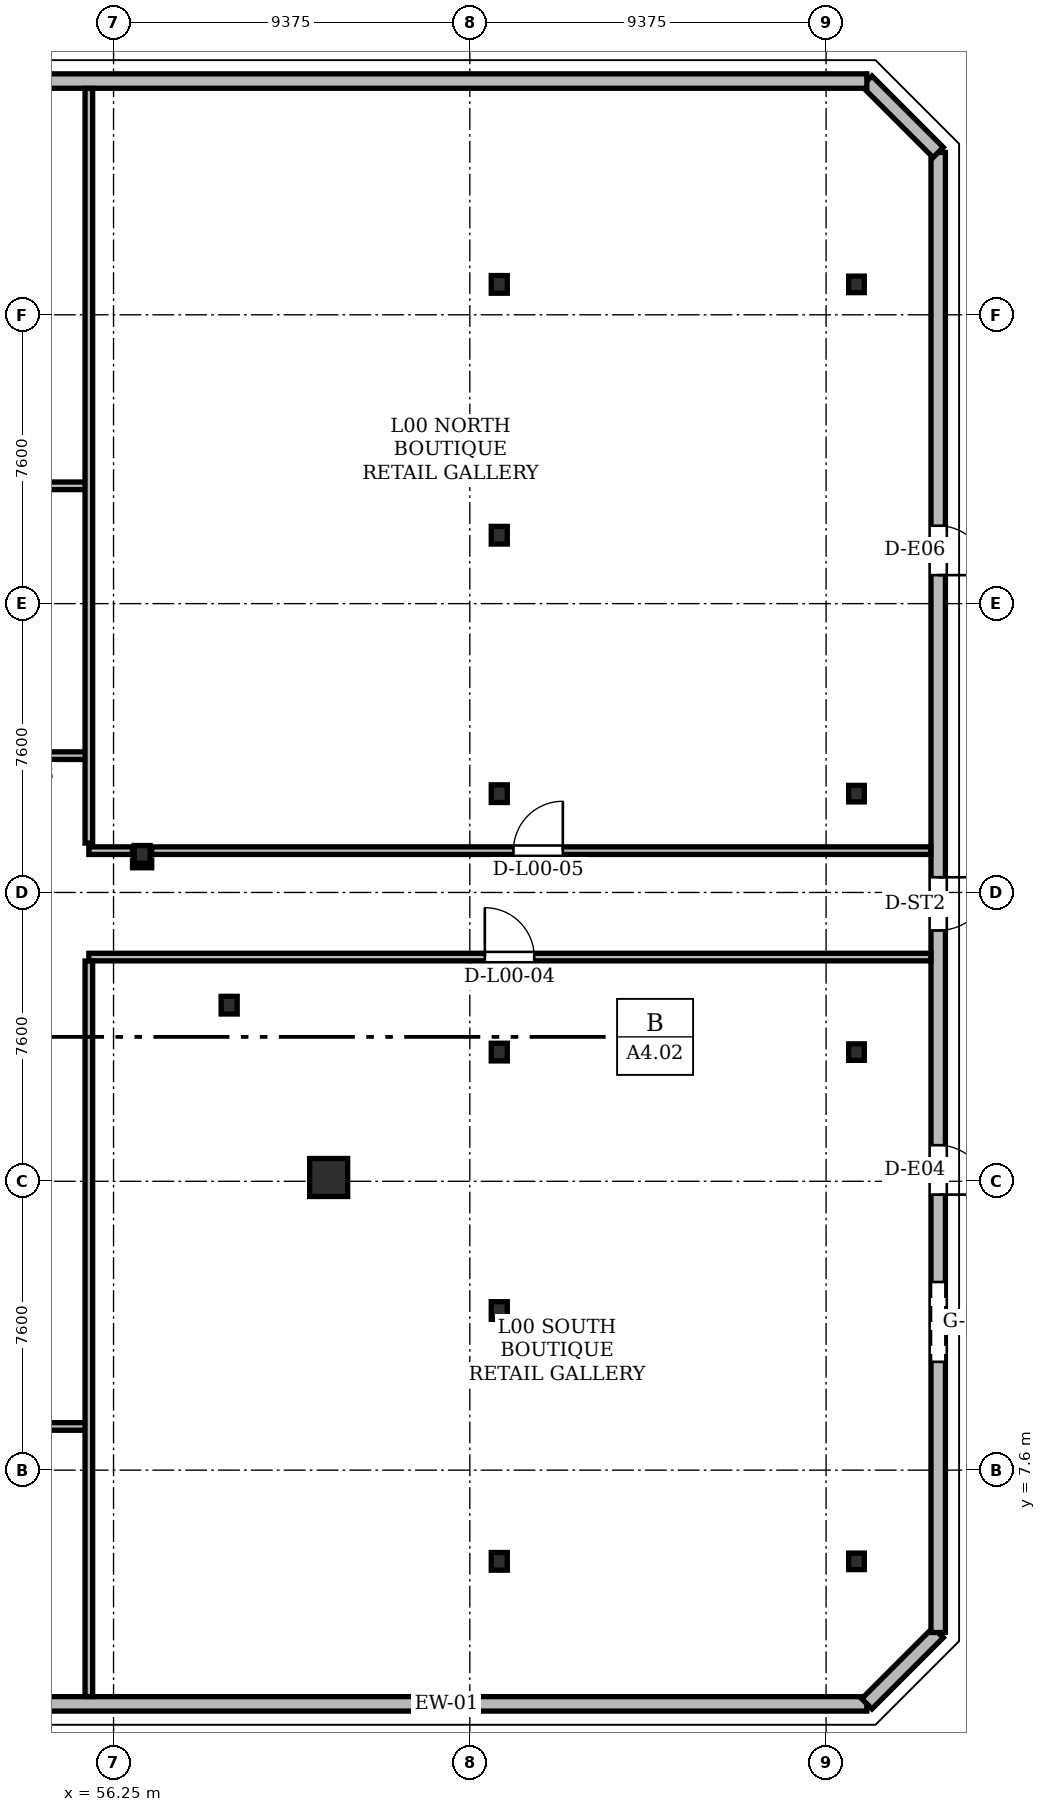
"""IFC4 building model, lengths in metres.
Left out: names, types, materials, properties, quantities, classifications, styles, units other than length and angle.
Written with IfcOpenShell. Run it as: python <this file> out.ifc"""

import sys

from ifc_helpers import new_model, si_unit, direction, frame, frame_2d, origin, origin_2d, place, context, subcontext, project, spatial, rectangle, hollow_rectangle, i_section, extrude, element, fill, save


model = new_model("IFC4")
c1 = context("Model", 3, precision=1e-05, world=origin(), true_north=direction((0.0, 1.0)))
c2 = subcontext(c1, "Body", "Model", "MODEL_VIEW")
j1 = project(units=[si_unit("LENGTHUNIT", "METRE"), si_unit("PLANEANGLEUNIT", "RADIAN")], contexts=[c1])
p1 = place(None, origin())
s1 = spatial("IfcSite", under=j1, at=p1, CompositionType="ELEMENT")
p2 = place(p1, origin())
s2 = spatial("IfcBuilding", under=s1, at=p2, CompositionType="ELEMENT")
p3 = place(p2, origin())
s3 = spatial("IfcBuildingStorey", under=s2, at=p3, CompositionType="ELEMENT", Elevation=0.0)
p4 = place(p3, frame((61.91, 15.3, 0.004), z_axis=(0.0, 0.0, 1.0), x_axis=(1.0, 0.0, 0.0)))
e1 = element("IfcColumn", 1, at=p4, inside=s3, PredefinedType="COLUMN", context=c2, shape_type="SweptSolid", body=[
    extrude(hollow_rectangle(XDim=1.0, YDim=1.0, WallThickness=0.085, at=origin_2d()), origin(), (0.0, 0.0, 1.0), 5.391),
])
for number, where, z_axis, x_axis in (
    (2, (59.292, 19.834, 0.004), (0.0, 0.0, 1.0), (1.0, 0.0, 0.0)),
    (3, (57.002, 23.802, 0.004), (0.0, 0.0, 1.0), (1.0, 0.0, 0.0)),
):
    element("IfcColumn", number, at=place(p3, frame(where, z_axis=z_axis, x_axis=x_axis)), inside=s3, PredefinedType="COLUMN", context=c2, shape_type="SweptSolid", body=[
        extrude(i_section(OverallWidth=0.422, OverallDepth=0.465, WebThickness=0.045, FlangeThickness=0.072, at=origin_2d()), origin(), (0.0, 0.0, 1.0), 5.391),
    ])
for number, where, z_axis, x_axis in (
    (4, (66.4, 5.2, 0.0), (0.0, 0.0, 1.0), (1.0, 0.0, 0.0)),
    (5, (66.4, 11.8, 0.0), (0.0, 0.0, 1.0), (1.0, 0.0, 0.0)),
    (6, (66.4, 18.6, 0.0), (0.0, 0.0, 1.0), (1.0, 0.0, 0.0)),
    (7, (66.4, 25.4, 0.0), (0.0, 0.0, 1.0), (1.0, 0.0, 0.0)),
    (8, (66.4, 32.2, 0.0), (0.0, 0.0, 1.0), (1.0, 0.0, 0.0)),
    (9, (66.4, 38.8, 0.0), (0.0, 0.0, 1.0), (1.0, 0.0, 0.0)),
):
    element("IfcColumn", number, at=place(p3, frame(where, z_axis=z_axis, x_axis=x_axis)), inside=s3, PredefinedType="COLUMN", context=c2, shape_type="SweptSolid", body=[
        extrude(i_section(OverallWidth=0.422, OverallDepth=0.465, WebThickness=0.045, FlangeThickness=0.072, at=origin_2d()), origin(), (0.0, 0.0, 1.0), 5.4),
    ])
for number, where, z_axis, x_axis in (
    (10, (75.8, 5.2, 0.0), (0.0, 0.0, 1.0), (1.0, 0.0, 0.0)),
    (11, (75.8, 18.6, 0.0), (0.0, 0.0, 1.0), (1.0, 0.0, 0.0)),
    (12, (75.8, 25.4, 0.0), (0.0, 0.0, 1.0), (1.0, 0.0, 0.0)),
    (13, (75.8, 38.8, 0.0), (0.0, 0.0, 1.0), (1.0, 0.0, 0.0)),
):
    element("IfcColumn", number, at=place(p3, frame(where, z_axis=z_axis, x_axis=x_axis)), inside=s3, PredefinedType="COLUMN", context=c2, shape_type="SweptSolid", body=[
        extrude(i_section(OverallWidth=0.411, OverallDepth=0.434, WebThickness=0.036, FlangeThickness=0.057, at=origin_2d()), origin(), (0.0, 0.0, 1.0), 5.4),
    ])
p5 = place(p3, frame((76.072, 1.45, 0.0), z_axis=(0.0, 0.0, 1.0), x_axis=(-1.0, 0.0, 0.0)))
e14 = element("IfcWall", 14, at=p5, inside=s3, PredefinedType="SOLIDWALL", context=c2, shape_type="SweptSolid", body=[
    extrude(rectangle(XDim=77.145, YDim=0.38, at=frame_2d((38.572, 0.0))), origin(), (0.0, 0.0, 1.0), 4.183),
])
p6 = place(p5, frame((40.972, 0.0, 0.0)))
e15 = element("IfcOpeningElement", 15, at=p6, cuts=e14, PredefinedType="OPENING", context=c2, shape_type="SweptSolid", body=[
    extrude(rectangle(XDim=1.8, YDim=2.35, at=frame_2d((0.9, 1.175))), frame((0.0, 0.19, 0.0), z_axis=(0.0, -1.0, 0.0), x_axis=(1.0, 0.0, 0.0)), (0.0, 0.0, 1.0), 0.38),
])
p7 = place(p5, frame((34.372, 0.0, 0.0)))
e16 = element("IfcOpeningElement", 16, at=p7, cuts=e14, PredefinedType="OPENING", context=c2, shape_type="SweptSolid", body=[
    extrude(rectangle(XDim=1.8, YDim=2.35, at=frame_2d((0.9, 1.175))), frame((0.0, 0.19, 0.0), z_axis=(0.0, -1.0, 0.0), x_axis=(1.0, 0.0, 0.0)), (0.0, 0.0, 1.0), 0.38),
])
p8 = place(p5, frame((57.422, 0.0, 0.0)))
e17 = element("IfcOpeningElement", 17, at=p8, cuts=e14, PredefinedType="OPENING", context=c2, shape_type="SweptSolid", body=[
    extrude(rectangle(XDim=1.3, YDim=2.25, at=frame_2d((0.65, 1.125))), frame((0.0, 0.19, 0.0), z_axis=(0.0, -1.0, 0.0), x_axis=(1.0, 0.0, 0.0)), (0.0, 0.0, 1.0), 0.38),
])
p9 = place(p5, frame((23.622, 0.0, 0.0)))
e18 = element("IfcOpeningElement", 18, at=p9, cuts=e14, PredefinedType="OPENING", context=c2, shape_type="SweptSolid", body=[
    extrude(rectangle(XDim=1.3, YDim=2.25, at=frame_2d((0.65, 1.125))), frame((0.0, 0.19, 0.0), z_axis=(0.0, -1.0, 0.0), x_axis=(1.0, 0.0, 0.0)), (0.0, 0.0, 1.0), 0.38),
])
p10 = place(p3, frame((77.95, 3.328, 0.0), z_axis=(0.0, 0.0, 1.0), x_axis=(-0.707060812925, -0.70715274646, 0.0)))
e19 = element("IfcWall", 19, at=p10, inside=s3, PredefinedType="SOLIDWALL", context=c2, shape_type="SweptSolid", body=[
    extrude(rectangle(XDim=2.656, YDim=0.38, at=frame_2d((1.328, 0.0))), origin(), (0.0, 0.0, 1.0), 5.12),
])
p11 = place(p3, frame((77.95, 42.272, 0.0), z_axis=(0.0, 0.0, 1.0), x_axis=(0.0, -1.0, 0.0)))
e20 = element("IfcWall", 20, at=p11, inside=s3, PredefinedType="SOLIDWALL", context=c2, shape_type="SweptSolid", body=[
    extrude(rectangle(XDim=38.944, YDim=0.38, at=frame_2d((19.472, 0.0))), origin(), (0.0, 0.0, 1.0), 5.12),
])
p12 = place(p11, frame((26.122, 0.0, 0.0)))
e21 = element("IfcOpeningElement", 21, at=p12, cuts=e20, PredefinedType="OPENING", context=c2, shape_type="SweptSolid", body=[
    extrude(rectangle(XDim=1.3, YDim=2.25, at=frame_2d((0.65, 1.125))), frame((0.0, 0.19, 0.0), z_axis=(0.0, -1.0, 0.0), x_axis=(1.0, 0.0, 0.0)), (0.0, 0.0, 1.0), 0.38),
])
p13 = place(p11, frame((19.072, 0.0, 0.0)))
e22 = element("IfcOpeningElement", 22, at=p13, cuts=e20, PredefinedType="OPENING", context=c2, shape_type="SweptSolid", body=[
    extrude(rectangle(XDim=1.4, YDim=2.2, at=frame_2d((0.7, 1.1))), frame((0.0, 0.19, 0.0), z_axis=(0.0, -1.0, 0.0), x_axis=(1.0, 0.0, 0.0)), (0.0, 0.0, 1.0), 0.38),
])
p14 = place(p11, frame((29.722, 0.0, 0.0)))
e23 = element("IfcOpeningElement", 23, at=p14, cuts=e20, PredefinedType="OPENING", context=c2, shape_type="SweptSolid", body=[
    extrude(rectangle(XDim=2.1, YDim=2.3, at=frame_2d((1.05, 1.15))), frame((0.0, 0.19, 0.0), z_axis=(0.0, -1.0, 0.0), x_axis=(1.0, 0.0, 0.0)), (0.0, 0.0, 1.0), 0.38),
])
p15 = place(p11, frame((9.822, 0.0, 0.0)))
e24 = element("IfcOpeningElement", 24, at=p15, cuts=e20, PredefinedType="OPENING", context=c2, shape_type="SweptSolid", body=[
    extrude(rectangle(XDim=1.3, YDim=2.25, at=frame_2d((0.65, 1.125))), frame((0.0, 0.19, 0.0), z_axis=(0.0, -1.0, 0.0), x_axis=(1.0, 0.0, 0.0)), (0.0, 0.0, 1.0), 0.38),
])
p16 = place(p3, frame((76.072, 44.15, 0.0), z_axis=(0.0, 0.0, 1.0), x_axis=(0.707106781187, -0.707106781187, 0.0)))
e25 = element("IfcWall", 25, at=p16, inside=s3, PredefinedType="SOLIDWALL", context=c2, shape_type="SweptSolid", body=[
    extrude(rectangle(XDim=2.656, YDim=0.38, at=frame_2d((1.328, 0.0))), origin(), (0.0, 0.0, 1.0), 5.12),
])
p17 = place(p3, frame((-1.072, 44.15, 0.0), z_axis=(0.0, 0.0, 1.0), x_axis=(1.0, 0.0, 0.0)))
e26 = element("IfcWall", 26, at=p17, inside=s3, PredefinedType="SOLIDWALL", context=c2, shape_type="SweptSolid", body=[
    extrude(rectangle(XDim=77.145, YDim=0.38, at=frame_2d((38.572, 0.0))), origin(), (0.0, 0.0, 1.0), 5.12),
])
p18 = place(p17, frame((24.872, 0.0, 0.0)))
e27 = element("IfcOpeningElement", 27, at=p18, cuts=e26, PredefinedType="OPENING", context=c2, shape_type="SweptSolid", body=[
    extrude(rectangle(XDim=1.4, YDim=2.2, at=frame_2d((0.7, 1.1))), frame((0.0, 0.19, 0.0), z_axis=(0.0, -1.0, 0.0), x_axis=(1.0, 0.0, 0.0)), (0.0, 0.0, 1.0), 0.38),
])
p19 = place(p17, frame((39.472, 0.0, 0.0)))
e28 = element("IfcOpeningElement", 28, at=p19, cuts=e26, PredefinedType="OPENING", context=c2, shape_type="SweptSolid", body=[
    extrude(rectangle(XDim=3.2, YDim=3.0, at=frame_2d((1.6, 1.5))), frame((0.0, 0.19, 0.0), z_axis=(0.0, -1.0, 0.0), x_axis=(1.0, 0.0, 0.0)), (0.0, 0.0, 1.0), 0.38),
])
p20 = place(p3, frame((13.99, 8.75, 0.0), z_axis=(0.0, 0.0, 1.0), x_axis=(1.0, 0.0, 0.0)))
e29 = element("IfcWall", 29, at=p20, inside=s3, PredefinedType="PARTITIONING", context=c2, shape_type="SweptSolid", body=[
    extrude(rectangle(XDim=41.61, YDim=0.2, at=frame_2d((20.805, 0.0))), origin(), (0.0, 0.0, 1.0), 4.183),
])
p21 = place(p20, frame((6.785, 0.0, 0.0)))
e30 = element("IfcOpeningElement", 30, at=p21, cuts=e29, PredefinedType="OPENING", context=c2, shape_type="SweptSolid", body=[
    extrude(rectangle(XDim=1.3, YDim=2.2, at=frame_2d((0.65, 1.1))), frame((0.0, 0.1, 0.0), z_axis=(0.0, -1.0, 0.0), x_axis=(1.0, 0.0, 0.0)), (0.0, 0.0, 1.0), 0.2),
])
p22 = place(p20, frame((23.235, 0.0, 0.0)))
e31 = element("IfcOpeningElement", 31, at=p22, cuts=e29, PredefinedType="OPENING", context=c2, shape_type="SweptSolid", body=[
    extrude(rectangle(XDim=1.3, YDim=2.2, at=frame_2d((0.65, 1.1))), frame((0.0, 0.1, 0.0), z_axis=(0.0, -1.0, 0.0), x_axis=(1.0, 0.0, 0.0)), (0.0, 0.0, 1.0), 0.2),
])
p23 = place(p20, frame((37.534, 0.0, 0.0)))
e32 = element("IfcOpeningElement", 32, at=p23, cuts=e29, PredefinedType="OPENING", context=c2, shape_type="SweptSolid", body=[
    extrude(rectangle(XDim=1.0, YDim=2.18, at=frame_2d((0.5, 1.09))), frame((0.0, 0.1, 0.0), z_axis=(0.0, -1.0, 0.0), x_axis=(1.0, 0.0, 0.0)), (0.0, 0.0, 1.0), 0.2),
])
p24 = place(p3, frame((55.6, 21.1, 0.0), z_axis=(0.0, 0.0, 1.0), x_axis=(1.0, 0.0, 0.0)))
e33 = element("IfcWall", 33, at=p24, inside=s3, PredefinedType="PARTITIONING", context=c2, shape_type="SweptSolid", body=[
    extrude(rectangle(XDim=22.156, YDim=0.2, at=frame_2d((11.078, 0.0))), origin(), (0.0, 0.0, 1.0), 4.183),
])
p25 = place(p24, frame((10.42, 0.0, 0.0)))
e34 = element("IfcOpeningElement", 34, at=p25, cuts=e33, PredefinedType="OPENING", context=c2, shape_type="SweptSolid", body=[
    extrude(rectangle(XDim=1.3, YDim=2.2, at=frame_2d((0.65, 1.1))), frame((0.0, 0.1, 0.0), z_axis=(0.0, -1.0, 0.0), x_axis=(1.0, 0.0, 0.0)), (0.0, 0.0, 1.0), 0.2),
])
p26 = place(p3, frame((56.749, 23.55, 0.0), z_axis=(0.0, 0.0, 1.0), x_axis=(1.0, 0.0, 0.0)))
e35 = element("IfcWall", 35, at=p26, inside=s3, PredefinedType="PARTITIONING", context=c2, shape_type="SweptSolid", body=[
    extrude(rectangle(XDim=0.505, YDim=0.2, at=frame_2d((0.252, 0.0))), origin(), (0.0, 0.0, 1.0), 4.254),
])
p27 = place(p3, frame((55.6, 23.9, 0.0), z_axis=(0.0, 0.0, 1.0), x_axis=(1.0, 0.0, 0.0)))
e36 = element("IfcWall", 36, at=p27, inside=s3, PredefinedType="PARTITIONING", context=c2, shape_type="SweptSolid", body=[
    extrude(rectangle(XDim=1.149, YDim=0.2, at=frame_2d((0.575, 0.0))), origin(), (0.0, 0.0, 1.0), 5.12),
])
p28 = place(p3, frame((57.254, 23.9, 0.0), z_axis=(0.0, 0.0, 1.0), x_axis=(1.0, 0.0, 0.0)))
e37 = element("IfcWall", 37, at=p28, inside=s3, PredefinedType="PARTITIONING", context=c2, shape_type="SweptSolid", body=[
    extrude(rectangle(XDim=20.502, YDim=0.2, at=frame_2d((10.251, 0.0))), origin(), (0.0, 0.0, 1.0), 4.183),
])
p29 = place(p28, frame((9.519, 0.0, 0.0)))
e38 = element("IfcOpeningElement", 38, at=p29, cuts=e37, PredefinedType="OPENING", context=c2, shape_type="SweptSolid", body=[
    extrude(rectangle(XDim=1.3, YDim=2.2, at=frame_2d((0.65, 1.1))), frame((0.0, 0.1, 0.0), z_axis=(0.0, -1.0, 0.0), x_axis=(1.0, 0.0, 0.0)), (0.0, 0.0, 1.0), 0.2),
])
p30 = place(p3, frame((28.62, 26.4, 0.0), z_axis=(0.0, 0.0, 1.0), x_axis=(1.0, 0.0, 0.0)))
e39 = element("IfcWall", 39, at=p30, inside=s3, PredefinedType="PARTITIONING", context=c2, shape_type="SweptSolid", body=[
    extrude(rectangle(XDim=26.98, YDim=0.2, at=frame_2d((13.49, 0.0))), origin(), (0.0, 0.0, 1.0), 4.183),
])
p31 = place(p30, frame((11.08, 0.0, 0.0)))
e40 = element("IfcOpeningElement", 40, at=p31, cuts=e39, PredefinedType="OPENING", context=c2, shape_type="SweptSolid", body=[
    extrude(rectangle(XDim=1.45, YDim=2.25, at=frame_2d((0.725, 1.125))), frame((0.0, 0.1, 0.0), z_axis=(0.0, -1.0, 0.0), x_axis=(1.0, 0.0, 0.0)), (0.0, 0.0, 1.0), 0.2),
])
p32 = place(p30, frame((20.14, 0.0, 0.0)))
e41 = element("IfcOpeningElement", 41, at=p32, cuts=e39, PredefinedType="OPENING", context=c2, shape_type="SweptSolid", body=[
    extrude(rectangle(XDim=0.88, YDim=2.08, at=frame_2d((0.44, 1.04))), frame((0.0, 0.1, 0.0), z_axis=(0.0, -1.0, 0.0), x_axis=(1.0, 0.0, 0.0)), (0.0, 0.0, 1.0), 0.2),
])
p33 = place(p30, frame((24.414, 0.0, 0.0)))
e42 = element("IfcOpeningElement", 42, at=p33, cuts=e39, PredefinedType="OPENING", context=c2, shape_type="SweptSolid", body=[
    extrude(rectangle(XDim=0.88, YDim=2.08, at=frame_2d((0.44, 1.04))), frame((0.0, 0.1, 0.0), z_axis=(0.0, -1.0, 0.0), x_axis=(1.0, 0.0, 0.0)), (0.0, 0.0, 1.0), 0.2),
])
p34 = place(p3, frame((51.4, 33.5, 0.0), z_axis=(0.0, 0.0, 1.0), x_axis=(1.0, 0.0, 0.0)))
e43 = element("IfcWall", 43, at=p34, inside=s3, PredefinedType="PARTITIONING", context=c2, shape_type="SweptSolid", body=[
    extrude(rectangle(XDim=4.2, YDim=0.2, at=frame_2d((2.1, 0.0))), origin(), (0.0, 0.0, 1.0), 4.254),
])
p35 = place(p3, frame((55.6, 1.644, 0.0), z_axis=(0.0, 0.0, 1.0), x_axis=(0.0, 1.0, 0.0)))
e44 = element("IfcWall", 44, at=p35, inside=s3, PredefinedType="PARTITIONING", context=c2, shape_type="SweptSolid", body=[
    extrude(rectangle(XDim=19.352, YDim=0.2, at=frame_2d((9.676, 0.0))), origin(), (0.0, 0.0, 1.0), 4.254),
])
p36 = place(p3, frame((55.6, 24.1, 0.0), z_axis=(0.0, 0.0, 1.0), x_axis=(0.0, 1.0, 0.0)))
e45 = element("IfcWall", 45, at=p36, inside=s3, PredefinedType="PARTITIONING", context=c2, shape_type="SweptSolid", body=[
    extrude(rectangle(XDim=19.856, YDim=0.2, at=frame_2d((9.928, 0.0))), origin(), (0.0, 0.0, 1.0), 3.91),
])
p37 = place(p12, origin())
e46 = element("IfcDoor", 46, at=p37, inside=s3, OperationType="SINGLE_SWING_RIGHT", PredefinedType="DOOR", context=c2, shape_type="SweptSolid", body=[
    extrude(rectangle(XDim=1.3, YDim=2.25, at=frame_2d((0.65, 1.125))), frame((0.0, 0.025, 0.0), z_axis=(0.0, -1.0, 0.0), x_axis=(1.0, 0.0, 0.0)), (0.0, 0.0, 1.0), 0.05),
])
fill(e21, e46)
p38 = place(p13, origin())
e47 = element("IfcDoor", 47, at=p38, inside=s3, OperationType="SINGLE_SWING_LEFT", PredefinedType="DOOR", context=c2, shape_type="SweptSolid", body=[
    extrude(rectangle(XDim=1.4, YDim=2.2, at=frame_2d((0.7, 1.1))), frame((0.0, 0.025, 0.0), z_axis=(0.0, -1.0, 0.0), x_axis=(1.0, 0.0, 0.0)), (0.0, 0.0, 1.0), 0.05),
])
fill(e22, e47)
p39 = place(p14, origin())
e48 = element("IfcDoor", 48, at=p39, inside=s3, OperationType="SINGLE_SWING_RIGHT", PredefinedType="GATE", context=c2, shape_type="SweptSolid", body=[
    extrude(rectangle(XDim=2.1, YDim=2.3, at=frame_2d((1.05, 1.15))), frame((0.0, 0.025, 0.0), z_axis=(0.0, -1.0, 0.0), x_axis=(1.0, 0.0, 0.0)), (0.0, 0.0, 1.0), 0.05),
])
fill(e23, e48)
p40 = place(p15, origin())
e49 = element("IfcDoor", 49, at=p40, inside=s3, OperationType="SINGLE_SWING_RIGHT", PredefinedType="DOOR", context=c2, shape_type="SweptSolid", body=[
    extrude(rectangle(XDim=1.3, YDim=2.25, at=frame_2d((0.65, 1.125))), frame((0.0, 0.025, 0.0), z_axis=(0.0, -1.0, 0.0), x_axis=(1.0, 0.0, 0.0)), (0.0, 0.0, 1.0), 0.05),
])
fill(e24, e49)
p41 = place(p25, origin())
e50 = element("IfcDoor", 50, at=p41, inside=s3, OperationType="SINGLE_SWING_LEFT", PredefinedType="DOOR", context=c2, shape_type="SweptSolid", body=[
    extrude(rectangle(XDim=1.3, YDim=2.2, at=frame_2d((0.65, 1.1))), frame((0.0, 0.025, 0.0), z_axis=(0.0, -1.0, 0.0), x_axis=(1.0, 0.0, 0.0)), (0.0, 0.0, 1.0), 0.05),
])
fill(e34, e50)
p42 = place(p29, origin())
e51 = element("IfcDoor", 51, at=p42, inside=s3, OperationType="SINGLE_SWING_RIGHT", PredefinedType="DOOR", context=c2, shape_type="SweptSolid", body=[
    extrude(rectangle(XDim=1.3, YDim=2.2, at=frame_2d((0.65, 1.1))), frame((0.0, 0.025, 0.0), z_axis=(0.0, -1.0, 0.0), x_axis=(1.0, 0.0, 0.0)), (0.0, 0.0, 1.0), 0.05),
])
fill(e38, e51)
save(model, sys.argv[1])
